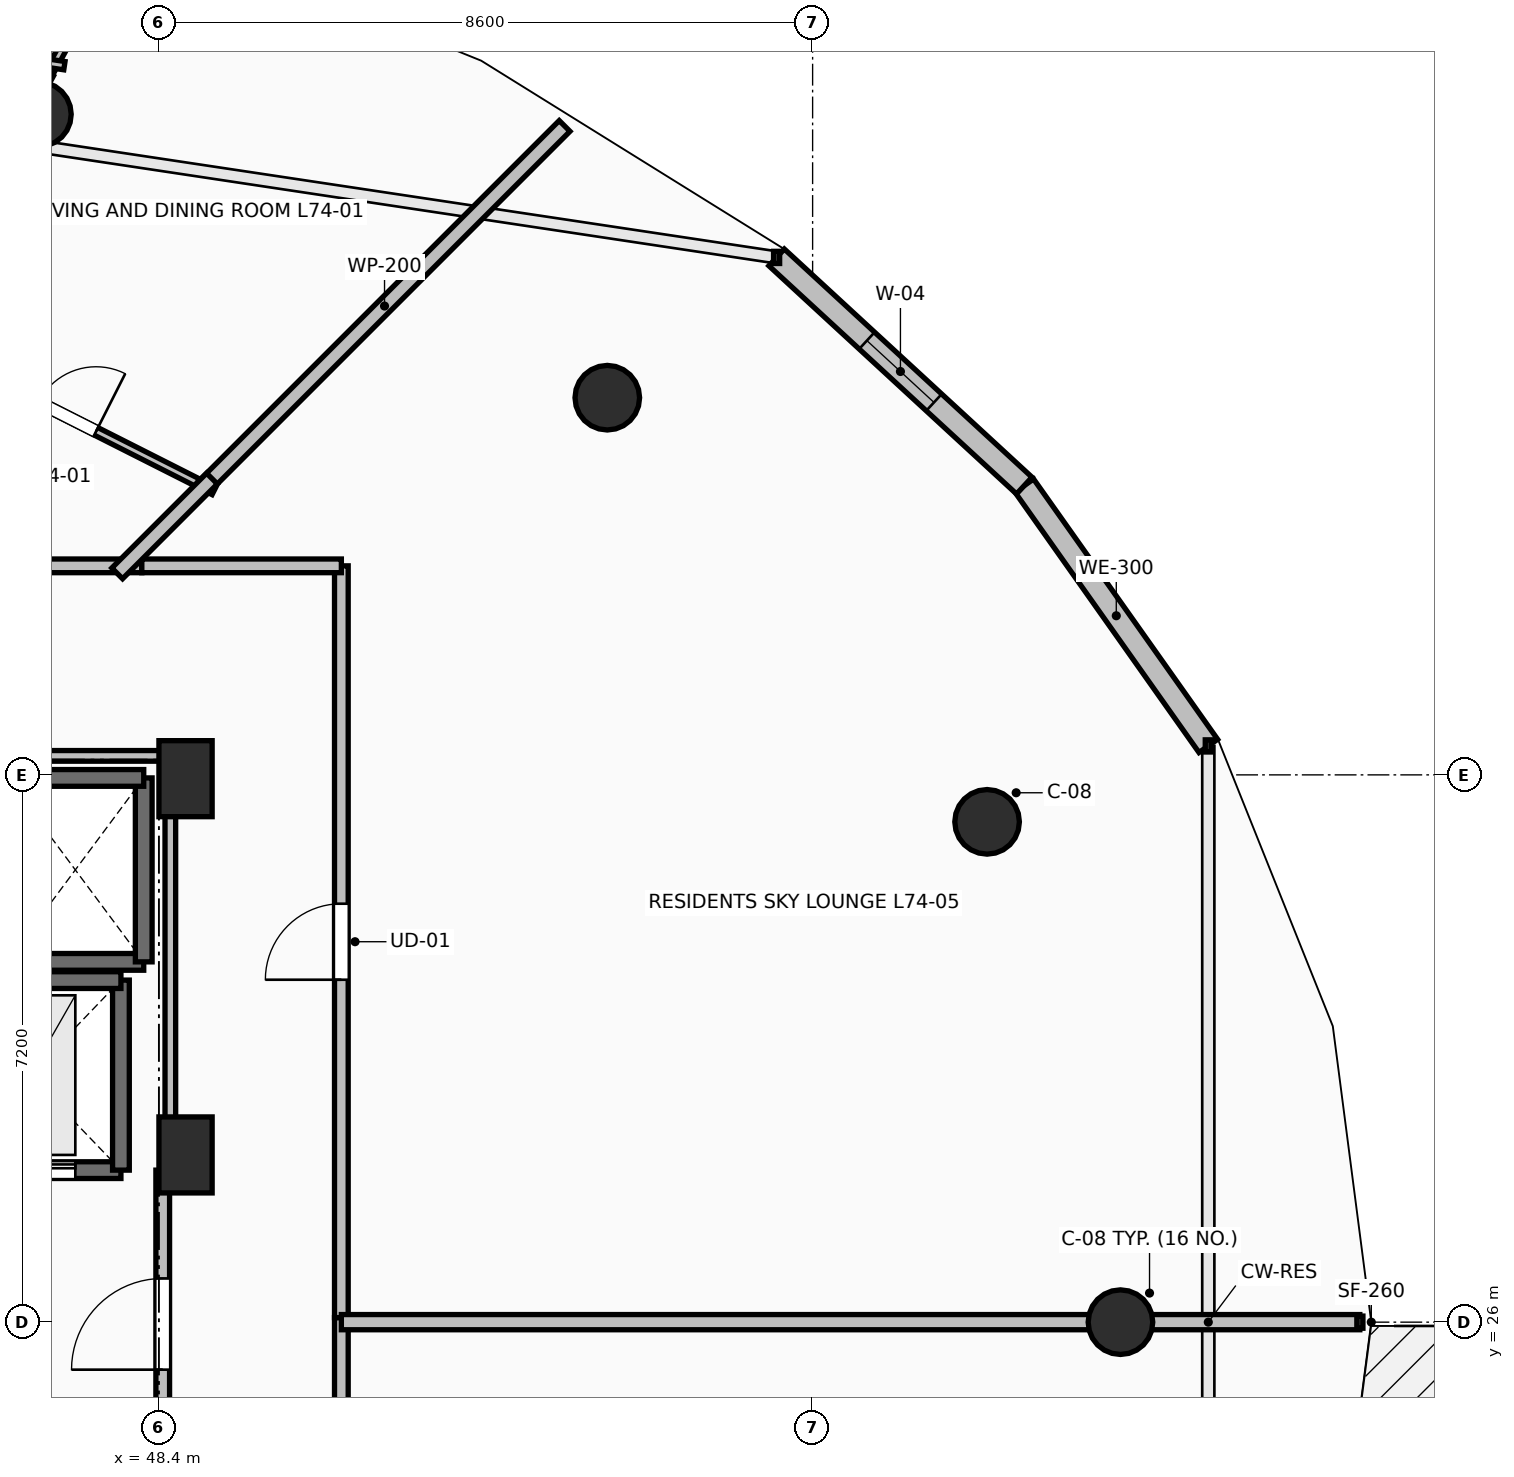
"""IFC4 building model, lengths in metres.
Left out: names, types, materials, properties, quantities, classifications, styles, units other than length and angle.
Written with IfcOpenShell. Run it as: python <this file> out.ifc"""

import sys

from ifc_helpers import new_model, si_unit, direction, frame, frame_2d, origin, origin_2d, place, context, subcontext, project, spatial, rectangle, circle, extrude, element, fill, save


model = new_model("IFC4")
c1 = context("Model", 3, precision=1e-05, world=origin(), true_north=direction((0.0, 1.0)))
c2 = subcontext(c1, "Body", "Model", "MODEL_VIEW")
j1 = project(units=[si_unit("LENGTHUNIT", "METRE"), si_unit("PLANEANGLEUNIT", "RADIAN")], contexts=[c1])
p1 = place(None, origin())
s1 = spatial("IfcSite", under=j1, at=p1, CompositionType="ELEMENT")
p2 = place(p1, origin())
s2 = spatial("IfcBuilding", under=s1, at=p2, CompositionType="ELEMENT")
p3 = place(p2, frame((0.0, 0.0, 273.3)))
s3 = spatial("IfcBuildingStorey", under=s2, at=p3, CompositionType="ELEMENT", Elevation=273.3)
for number, where, z_axis, x_axis in (
    (1, (61.05, 26.0, 0.0), (0.0, 0.0, 1.0), (1.0, 0.0, 0.0)),
    (2, (59.295, 32.582, 0.0), (0.0, 0.0, 1.0), (0.924, 0.383, 0.0)),
    (3, (54.299, 38.162, 0.0), (0.0, 0.0, 1.0), (0.707, 0.707, 0.0)),
    (4, (46.821, 41.891, 0.0), (0.0, 0.0, 1.0), (0.383, 0.924, 0.0)),
):
    element("IfcColumn", number, at=place(p3, frame(where, z_axis=z_axis, x_axis=x_axis)), inside=s3, PredefinedType="COLUMN", context=c2, shape_type="SweptSolid", body=[
        extrude(circle(Radius=0.425, at=origin_2d()), origin(), (0.0, 0.0, 1.0), 3.55),
    ])
for number, where, z_axis, x_axis in (
    (5, (48.75, 33.15, 0.0), (0.0, 0.0, 1.0), (1.0, 0.0, 0.0)),
    (6, (48.75, 28.2, 0.0), (0.0, 0.0, 1.0), (1.0, 0.0, 0.0)),
):
    element("IfcColumn", number, at=place(p3, frame(where, z_axis=z_axis, x_axis=x_axis)), inside=s3, PredefinedType="PILASTER", context=c2, shape_type="SweptSolid", body=[
        extrude(rectangle(XDim=0.7, YDim=1.0, at=origin_2d()), origin(), (0.0, 0.0, 1.0), 3.55),
    ])
p4 = place(p3, frame((62.206, 33.581, 0.0), z_axis=(0.0, 0.0, 1.0), x_axis=(-0.577261247247, 0.816559521668, 0.0)))
e7 = element("IfcWall", 7, at=p4, inside=s3, PredefinedType="STANDARD", context=c2, shape_type="SweptSolid", body=[
    extrude(rectangle(XDim=4.194, YDim=0.3, at=frame_2d((2.097, 0.0))), origin(), (0.0, 0.0, 1.0), 3.29),
])
p5 = place(p3, frame((59.784, 37.006, 0.0), z_axis=(0.0, 0.0, 1.0), x_axis=(-0.735445373611, 0.677584018727, 0.0)))
e8 = element("IfcWall", 8, at=p5, inside=s3, PredefinedType="STANDARD", context=c2, shape_type="SweptSolid", body=[
    extrude(rectangle(XDim=4.43, YDim=0.3, at=frame_2d((2.215, 0.0))), origin(), (0.0, 0.0, 1.0), 3.29),
])
p6 = place(p5, frame((1.615, 0.0, 0.85)))
e9 = element("IfcOpeningElement", 9, at=p6, cuts=e8, PredefinedType="OPENING", context=c2, shape_type="SweptSolid", body=[
    extrude(rectangle(XDim=1.2, YDim=2.1, at=frame_2d((0.6, 1.05))), frame((0.0, 0.165, 0.0), z_axis=(0.0, -1.0, 0.0), x_axis=(1.0, 0.0, 0.0)), (0.0, 0.0, 1.0), 0.33),
])
p7 = place(p3, frame((46.4, 30.74, 0.0), z_axis=(0.0, 0.0, 1.0), x_axis=(1.0, 0.0, 0.0)))
e10 = element("IfcWall", 10, at=p7, inside=s3, PredefinedType="SOLIDWALL", context=c2, shape_type="SweptSolid", body=[
    extrude(rectangle(XDim=1.8, YDim=0.22, at=frame_2d((0.9, 0.0))), origin(), (0.0, 0.0, 1.0), 3.29),
])
p8 = place(p3, frame((48.2, 30.74, 0.0), z_axis=(0.0, 0.0, 1.0), x_axis=(0.0, 1.0, 0.0)))
e11 = element("IfcWall", 11, at=p8, inside=s3, PredefinedType="SOLIDWALL", context=c2, shape_type="SweptSolid", body=[
    extrude(rectangle(XDim=2.42, YDim=0.22, at=frame_2d((1.21, 0.0))), origin(), (0.0, 0.0, 1.0), 3.29),
])
p9 = place(p3, frame((48.2, 33.16, 0.0), z_axis=(0.0, 0.0, 1.0), x_axis=(-1.0, 0.0, 0.0)))
e12 = element("IfcWall", 12, at=p9, inside=s3, PredefinedType="SOLIDWALL", context=c2, shape_type="SweptSolid", body=[
    extrude(rectangle(XDim=1.8, YDim=0.22, at=frame_2d((0.9, 0.0))), origin(), (0.0, 0.0, 1.0), 3.29),
])
p10 = place(p3, frame((45.5, 28.0, 0.0), z_axis=(0.0, 0.0, 1.0), x_axis=(1.0, 0.0, 0.0)))
e13 = element("IfcWall", 13, at=p10, inside=s3, PredefinedType="SHEAR", context=c2, shape_type="SweptSolid", body=[
    extrude(rectangle(XDim=2.4, YDim=0.22, at=frame_2d((1.2, 0.0))), origin(), (0.0, 0.0, 1.0), 3.29),
])
p11 = place(p10, frame((0.6, 0.0, 0.0)))
e14 = element("IfcOpeningElement", 14, at=p11, cuts=e13, PredefinedType="OPENING", context=c2, shape_type="SweptSolid", body=[
    extrude(rectangle(XDim=1.2, YDim=2.2, at=frame_2d((0.6, 1.1))), frame((0.0, 0.125, 0.0), z_axis=(0.0, -1.0, 0.0), x_axis=(1.0, 0.0, 0.0)), (0.0, 0.0, 1.0), 0.25),
])
p12 = place(p3, frame((47.9, 28.0, 0.0), z_axis=(0.0, 0.0, 1.0), x_axis=(0.0, 1.0, 0.0)))
e15 = element("IfcWall", 15, at=p12, inside=s3, PredefinedType="SHEAR", context=c2, shape_type="SweptSolid", body=[
    extrude(rectangle(XDim=2.5, YDim=0.22, at=frame_2d((1.25, 0.0))), origin(), (0.0, 0.0, 1.0), 3.29),
])
p13 = place(p3, frame((47.9, 30.5, 0.0), z_axis=(0.0, 0.0, 1.0), x_axis=(-1.0, 0.0, 0.0)))
e16 = element("IfcWall", 16, at=p13, inside=s3, PredefinedType="SHEAR", context=c2, shape_type="SweptSolid", body=[
    extrude(rectangle(XDim=2.4, YDim=0.22, at=frame_2d((1.2, 0.0))), origin(), (0.0, 0.0, 1.0), 3.29),
])
p14 = place(p3, frame((48.45, 23.95, 0.0), z_axis=(0.0, 0.0, 1.0), x_axis=(0.0, 1.0, 0.0)))
e17 = element("IfcWall", 17, at=p14, inside=s3, PredefinedType="PARTITIONING", context=c2, shape_type="SweptSolid", body=[
    extrude(rectangle(XDim=4.05, YDim=0.18, at=frame_2d((2.025, 0.0))), origin(), (0.0, 0.0, 1.0), 3.29),
])
p15 = place(p14, frame((1.425, 0.0, 0.0)))
e18 = element("IfcOpeningElement", 18, at=p15, cuts=e17, PredefinedType="OPENING", context=c2, shape_type="SweptSolid", body=[
    extrude(rectangle(XDim=1.2, YDim=2.15, at=frame_2d((0.6, 1.075))), frame((0.0, 0.105, 0.0), z_axis=(0.0, -1.0, 0.0), x_axis=(1.0, 0.0, 0.0)), (0.0, 0.0, 1.0), 0.21),
])
p16 = place(p3, frame((48.175, 35.95, 0.0), z_axis=(0.0, 0.0, 1.0), x_axis=(-1.0, 0.0, 0.0)))
e19 = element("IfcWall", 19, at=p16, inside=s3, PredefinedType="PARTITIONING", context=c2, shape_type="SweptSolid", body=[
    extrude(rectangle(XDim=4.512, YDim=0.18, at=frame_2d((2.256, 0.0))), origin(), (0.0, 0.0, 1.0), 2.482),
])
p17 = place(p3, frame((50.8, 14.05, 0.0), z_axis=(0.0, 0.0, 1.0), x_axis=(0.0, 1.0, 0.0)))
e20 = element("IfcWall", 20, at=p17, inside=s3, PredefinedType="PARTITIONING", context=c2, shape_type="SweptSolid", body=[
    extrude(rectangle(XDim=12.01, YDim=0.18, at=frame_2d((6.005, 0.0))), origin(), (0.0, 0.0, 1.0), 2.482),
])
p18 = place(p17, frame((5.505, 0.0, 0.0)))
e21 = element("IfcOpeningElement", 21, at=p18, cuts=e20, PredefinedType="OPENING", context=c2, shape_type="SweptSolid", body=[
    extrude(rectangle(XDim=1.0, YDim=2.15, at=frame_2d((0.5, 1.075))), frame((0.0, 0.105, 0.0), z_axis=(0.0, -1.0, 0.0), x_axis=(1.0, 0.0, 0.0)), (0.0, 0.0, 1.0), 0.21),
])
p19 = place(p3, frame((50.8, 26.06, 0.0), z_axis=(0.0, 0.0, 1.0), x_axis=(0.0, 1.0, 0.0)))
e22 = element("IfcWall", 22, at=p19, inside=s3, PredefinedType="PARTITIONING", context=c2, shape_type="SweptSolid", body=[
    extrude(rectangle(XDim=9.89, YDim=0.18, at=frame_2d((4.945, 0.0))), origin(), (0.0, 0.0, 1.0), 2.482),
])
p20 = place(p19, frame((4.445, 0.0, 0.0)))
e23 = element("IfcOpeningElement", 23, at=p20, cuts=e22, PredefinedType="OPENING", context=c2, shape_type="SweptSolid", body=[
    extrude(rectangle(XDim=1.0, YDim=2.15, at=frame_2d((0.5, 1.075))), frame((0.0, 0.105, 0.0), z_axis=(0.0, -1.0, 0.0), x_axis=(1.0, 0.0, 0.0)), (0.0, 0.0, 1.0), 0.21),
])
p21 = place(p3, frame((50.8, 35.95, 0.0), z_axis=(0.0, 0.0, 1.0), x_axis=(-1.0, 0.0, 0.0)))
e24 = element("IfcWall", 24, at=p21, inside=s3, PredefinedType="PARTITIONING", context=c2, shape_type="SweptSolid", body=[
    extrude(rectangle(XDim=2.625, YDim=0.18, at=frame_2d((1.312, 0.0))), origin(), (0.0, 0.0, 1.0), 2.482),
])
p22 = place(p3, frame((45.264, 38.886, 0.0), z_axis=(0.0, 0.0, 1.0), x_axis=(0.892556527512, -0.450935522216, 0.0)))
e25 = element("IfcWall", 25, at=p22, inside=s3, PredefinedType="PARTITIONING", context=c2, shape_type="SweptSolid", body=[
    extrude(rectangle(XDim=4.325, YDim=0.11, at=frame_2d((2.162, 0.0))), origin(), (0.0, 0.0, 1.0), 2.482),
])
p23 = place(p22, frame((1.737, 0.0, 0.0)))
e26 = element("IfcOpeningElement", 26, at=p23, cuts=e25, PredefinedType="OPENING", context=c2, shape_type="SweptSolid", body=[
    extrude(rectangle(XDim=0.85, YDim=2.1, at=frame_2d((0.425, 1.05))), frame((0.0, 0.07, 0.0), z_axis=(0.0, -1.0, 0.0), x_axis=(1.0, 0.0, 0.0)), (0.0, 0.0, 1.0), 0.14),
])
p24 = place(p3, frame((48.044, 44.434, 0.0), z_axis=(0.0, 0.0, 1.0), x_axis=(-0.478485169604, -0.878095634011, 0.0)))
e27 = element("IfcWall", 27, at=p24, inside=s3, PredefinedType="PARTITIONING", context=c2, shape_type="SweptSolid", body=[
    extrude(rectangle(XDim=2.284, YDim=0.11, at=frame_2d((1.142, 0.0))), origin(), (0.0, 0.0, 1.0), 3.29),
])
p25 = place(p24, frame((0.692, 0.0, 0.0)))
e28 = element("IfcOpeningElement", 28, at=p25, cuts=e27, PredefinedType="OPENING", context=c2, shape_type="SweptSolid", body=[
    extrude(rectangle(XDim=0.9, YDim=2.1, at=frame_2d((0.45, 1.05))), frame((0.0, 0.07, 0.0), z_axis=(0.0, -1.0, 0.0), x_axis=(1.0, 0.0, 0.0)), (0.0, 0.0, 1.0), 0.14),
])
p26 = place(p3, frame((46.951, 42.428, 0.0), z_axis=(0.0, 0.0, 1.0), x_axis=(-0.478536562944, -0.878067627194, 0.0)))
e29 = element("IfcWall", 29, at=p26, inside=s3, PredefinedType="PARTITIONING", context=c2, shape_type="SweptSolid", body=[
    extrude(rectangle(XDim=1.897, YDim=0.14, at=frame_2d((0.949, 0.0))), origin(), (0.0, 0.0, 1.0), 3.29),
])
p27 = place(p3, frame((48.999, 36.999, 0.0), z_axis=(0.0, 0.0, 1.0), x_axis=(0.707106781187, 0.707106781187, 0.0)))
e30 = element("IfcWall", 30, at=p27, inside=s3, PredefinedType="PARTITIONING", context=c2, shape_type="SweptSolid", body=[
    extrude(rectangle(XDim=6.701, YDim=0.2, at=frame_2d((3.35, 0.0))), origin(), (0.0, 0.0, 1.0), 2.874),
])
p28 = place(p3, frame((47.851, 35.851, 0.0), z_axis=(0.0, 0.0, 1.0), x_axis=(0.707106781187, 0.707106781187, 0.0)))
e31 = element("IfcWall", 31, at=p28, inside=s3, PredefinedType="PARTITIONING", context=c2, shape_type="SweptSolid", body=[
    extrude(rectangle(XDim=1.763, YDim=0.2, at=frame_2d((0.882, 0.0))), origin(), (0.0, 0.0, 1.0), 2.482),
])
p29 = place(p3, frame((41.183, 43.429, 0.0), z_axis=(0.0, 0.0, 1.0), x_axis=(0.988879067965, -0.148721850918, 0.0)))
e32 = element("IfcWall", 32, at=p29, inside=s3, PredefinedType="PARTITIONING", context=c2, shape_type="SweptSolid", body=[
    extrude(rectangle(XDim=6.041, YDim=0.11, at=frame_2d((3.021, 0.0))), origin(), (0.0, 0.0, 1.0), 3.29),
])
p30 = place(p3, frame((64.199, 26.0, 0.0), z_axis=(0.0, 0.0, 1.0), x_axis=(-1.0, 0.0, 0.0)))
e33 = element("IfcWall", 33, at=p30, inside=s3, PredefinedType="PARTITIONING", context=c2, shape_type="SweptSolid", body=[
    extrude(rectangle(XDim=13.399, YDim=0.2, at=frame_2d((6.699, 0.0))), origin(), (0.0, 0.0, 1.0), 2.482),
])
p31 = place(p3, frame((48.55, 28.196, 0.0), z_axis=(0.0, 0.0, 1.0), x_axis=(0.0, 1.0, 0.0)))
e34 = element("IfcWall", 34, at=p31, inside=s3, PredefinedType="PARTITIONING", context=c2, shape_type="SweptSolid", body=[
    extrude(rectangle(XDim=5.254, YDim=0.14, at=frame_2d((2.627, 0.0))), origin(), (0.0, 0.0, 1.0), 2.482),
])
p32 = place(p3, frame((48.55, 33.45, 0.0), z_axis=(0.0, 0.0, 1.0), x_axis=(-1.0, 0.0, 0.0)))
e35 = element("IfcWall", 35, at=p32, inside=s3, PredefinedType="PARTITIONING", context=c2, shape_type="SweptSolid", body=[
    extrude(rectangle(XDim=4.21, YDim=0.14, at=frame_2d((2.105, 0.0))), origin(), (0.0, 0.0, 1.0), 2.482),
])
p33 = place(p6, origin())
e36 = element("IfcWindow", 36, at=p33, inside=s3, PartitioningType="SINGLE_PANEL", PredefinedType="WINDOW", context=c2, shape_type="SweptSolid", body=[
    extrude(rectangle(XDim=1.2, YDim=2.1, at=frame_2d((0.6, 1.05))), frame((0.0, 0.03, 0.0), z_axis=(0.0, -1.0, 0.0), x_axis=(1.0, 0.0, 0.0)), (0.0, 0.0, 1.0), 0.06),
])
fill(e9, e36)
p34 = place(p11, origin())
e37 = element("IfcDoor", 37, at=p34, inside=s3, OperationType="SLIDING_TO_LEFT", PredefinedType="DOOR", context=c2, shape_type="SweptSolid", body=[
    extrude(rectangle(XDim=1.2, YDim=2.2, at=frame_2d((0.6, 1.1))), frame((0.0, 0.025, 0.0), z_axis=(0.0, -1.0, 0.0), x_axis=(1.0, 0.0, 0.0)), (0.0, 0.0, 1.0), 0.05),
])
fill(e14, e37)
p35 = place(p15, origin())
e38 = element("IfcDoor", 38, at=p35, inside=s3, OperationType="SINGLE_SWING_LEFT", PredefinedType="DOOR", context=c2, shape_type="SweptSolid", body=[
    extrude(rectangle(XDim=1.2, YDim=2.15, at=frame_2d((0.6, 1.075))), frame((0.0, 0.025, 0.0), z_axis=(0.0, -1.0, 0.0), x_axis=(1.0, 0.0, 0.0)), (0.0, 0.0, 1.0), 0.05),
])
fill(e18, e38)
p36 = place(p20, origin())
e39 = element("IfcDoor", 39, at=p36, inside=s3, OperationType="SINGLE_SWING_LEFT", PredefinedType="DOOR", context=c2, shape_type="SweptSolid", body=[
    extrude(rectangle(XDim=1.0, YDim=2.15, at=frame_2d((0.5, 1.075))), frame((0.0, 0.025, 0.0), z_axis=(0.0, -1.0, 0.0), x_axis=(1.0, 0.0, 0.0)), (0.0, 0.0, 1.0), 0.05),
])
fill(e23, e39)
p37 = place(p23, origin())
e40 = element("IfcDoor", 40, at=p37, inside=s3, OperationType="SINGLE_SWING_RIGHT", PredefinedType="DOOR", context=c2, shape_type="SweptSolid", body=[
    extrude(rectangle(XDim=0.85, YDim=2.1, at=frame_2d((0.425, 1.05))), frame((0.0, 0.025, 0.0), z_axis=(0.0, -1.0, 0.0), x_axis=(1.0, 0.0, 0.0)), (0.0, 0.0, 1.0), 0.05),
])
fill(e26, e40)
save(model, sys.argv[1])
